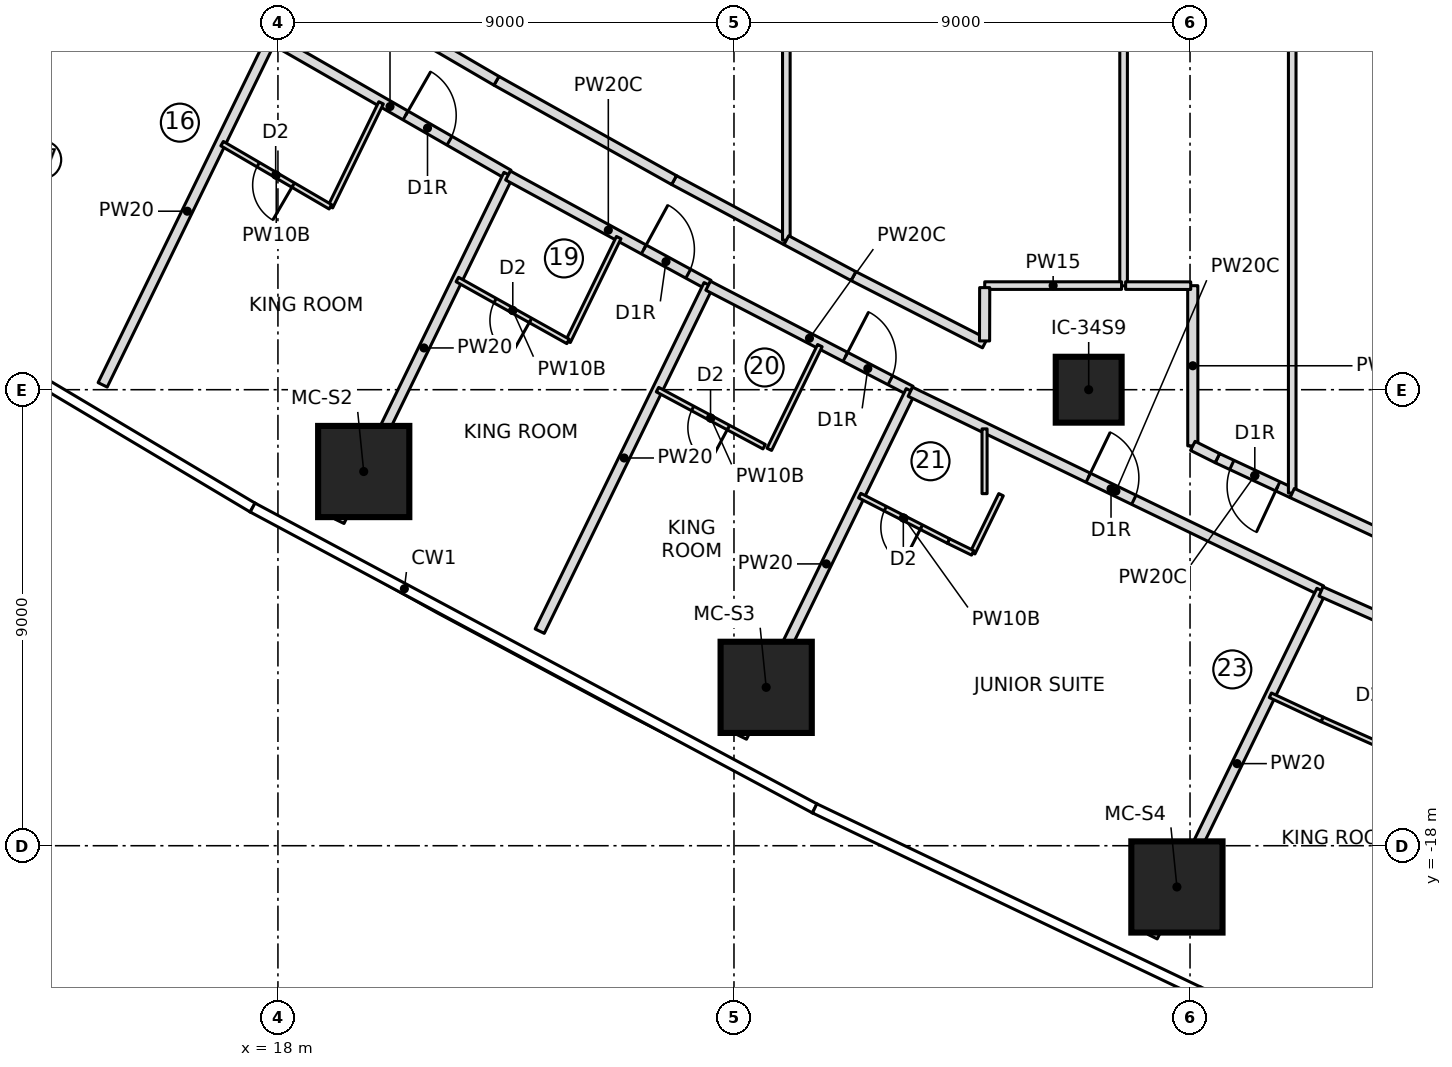
"""IFC4 building model, lengths in metres.
Left out: names, types, materials, properties, quantities, classifications, styles, units other than length and angle.
Written with IfcOpenShell. Run it as: python <this file> out.ifc"""

import sys

from ifc_helpers import new_model, si_unit, direction, frame, frame_2d, origin, origin_2d, place, context, subcontext, project, spatial, rectangle, extrude, element, fill, save


model = new_model("IFC4")
c1 = context("Model", 3, precision=1e-05, world=origin(), true_north=direction((0.0, 1.0)))
c2 = subcontext(c1, "Body", "Model", "MODEL_VIEW")
j1 = project(units=[si_unit("LENGTHUNIT", "METRE"), si_unit("PLANEANGLEUNIT", "RADIAN")], contexts=[c1])
p1 = place(None, origin())
s1 = spatial("IfcSite", under=j1, at=p1, CompositionType="ELEMENT")
p2 = place(p1, origin())
s2 = spatial("IfcBuilding", under=s1, at=p2, CompositionType="ELEMENT")
p3 = place(p2, frame((0.0, 0.0, 46.7)))
s3 = spatial("IfcBuildingStorey", under=s2, at=p3, CompositionType="ELEMENT", Elevation=46.7)
for number, where, z_axis, x_axis in (
    (1, (19.693, -10.615, 0.0), (0.0, 0.0, 1.0), (1.0, 0.0, 0.0)),
    (2, (27.635, -14.874, 0.0), (0.0, 0.0, 1.0), (1.0, 0.0, 0.0)),
    (3, (35.741, -18.814, 0.0), (0.0, 0.0, 1.0), (1.0, 0.0, 0.0)),
):
    element("IfcColumn", number, at=place(p3, frame(where, z_axis=z_axis, x_axis=x_axis)), inside=s3, PredefinedType="COLUMN", context=c2, shape_type="SweptSolid", body=[
        extrude(rectangle(XDim=1.8, YDim=1.8, at=origin_2d()), origin(), (0.0, 0.0, 1.0), 3.55),
    ])
p4 = place(p3, frame((34.0, -9.0, 0.0), z_axis=(0.0, 0.0, 1.0), x_axis=(1.0, 0.0, 0.0)))
e4 = element("IfcColumn", 4, at=p4, inside=s3, PredefinedType="COLUMN", context=c2, shape_type="SweptSolid", body=[
    extrude(rectangle(XDim=1.3, YDim=1.3, at=origin_2d()), origin(), (0.0, 0.0, 1.0), 3.55),
])
p5 = place(p3, frame((14.541, -8.904, 0.0), z_axis=(0.0, 0.0, 1.0), x_axis=(0.438213564788, 0.898870887078, 0.0)))
e5 = element("IfcWall", 5, at=p5, inside=s3, PredefinedType="PARTITIONING", context=c2, shape_type="SweptSolid", body=[
    extrude(rectangle(XDim=7.625, YDim=0.2, at=frame_2d((3.813, 0.0))), origin(), (0.0, 0.0, 1.0), 3.25),
])
p6 = place(p3, frame((17.874, -2.068, 0.0), z_axis=(0.0, 0.0, 1.0), x_axis=(0.867093061484, -0.4981461861, 0.0)))
e6 = element("IfcWall", 6, at=p6, inside=s3, PredefinedType="PARTITIONING", context=c2, shape_type="SweptSolid", body=[
    extrude(rectangle(XDim=5.393, YDim=0.2, at=frame_2d((2.697, 0.0))), origin(), (0.0, 0.0, 1.0), 3.25),
])
p7 = place(p6, frame((3.05, 0.0, 0.0)))
e7 = element("IfcOpeningElement", 7, at=p7, cuts=e6, PredefinedType="OPENING", context=c2, shape_type="SweptSolid", body=[
    extrude(rectangle(XDim=1.0, YDim=2.1, at=frame_2d((0.5, 1.05))), frame((0.0, 0.11, 0.0), z_axis=(0.0, -1.0, 0.0), x_axis=(1.0, 0.0, 0.0)), (0.0, 0.0, 1.0), 0.22),
])
p8 = place(p3, frame((20.035, -3.338, 0.0), z_axis=(0.0, 0.0, 1.0), x_axis=(-0.438122322582, -0.898915363344, 0.0)))
e8 = element("IfcWall", 8, at=p8, inside=s3, PredefinedType="PARTITIONING", context=c2, shape_type="SweptSolid", body=[
    extrude(rectangle(XDim=2.283, YDim=0.1, at=frame_2d((1.142, 0.0))), origin(), (0.0, 0.0, 1.0), 3.25),
])
p9 = place(p3, frame((19.035, -5.39, 0.0), z_axis=(0.0, 0.0, 1.0), x_axis=(-0.863707305865, 0.503993739837, 0.0)))
e9 = element("IfcWall", 9, at=p9, inside=s3, PredefinedType="PARTITIONING", context=c2, shape_type="SweptSolid", body=[
    extrude(rectangle(XDim=2.474, YDim=0.1, at=frame_2d((1.237, 0.0))), origin(), (0.0, 0.0, 1.0), 3.25),
])
p10 = place(p9, frame((0.85, 0.0, 0.0)))
e10 = element("IfcOpeningElement", 10, at=p10, cuts=e9, PredefinedType="OPENING", context=c2, shape_type="SweptSolid", body=[
    extrude(rectangle(XDim=0.8, YDim=2.1, at=frame_2d((0.4, 1.05))), frame((0.0, 0.06, 0.0), z_axis=(0.0, -1.0, 0.0), x_axis=(1.0, 0.0, 0.0)), (0.0, 0.0, 1.0), 0.12),
])
p11 = place(p3, frame((19.214, -11.597, 0.0), z_axis=(0.0, 0.0, 1.0), x_axis=(0.438210669268, 0.898872298683, 0.0)))
e11 = element("IfcWall", 11, at=p11, inside=s3, PredefinedType="PARTITIONING", context=c2, shape_type="SweptSolid", body=[
    extrude(rectangle(XDim=7.612, YDim=0.2, at=frame_2d((3.806, 0.0))), origin(), (0.0, 0.0, 1.0), 3.25),
])
p12 = place(p3, frame((22.541, -4.773, 0.0), z_axis=(0.0, 0.0, 1.0), x_axis=(0.878098348451, -0.478480188146, 0.0)))
e12 = element("IfcWall", 12, at=p12, inside=s3, PredefinedType="PARTITIONING", context=c2, shape_type="SweptSolid", body=[
    extrude(rectangle(XDim=4.508, YDim=0.2, at=frame_2d((2.254, 0.0))), origin(), (0.0, 0.0, 1.0), 3.25),
])
p13 = place(p12, frame((3.05, 0.0, 0.0)))
e13 = element("IfcOpeningElement", 13, at=p13, cuts=e12, PredefinedType="OPENING", context=c2, shape_type="SweptSolid", body=[
    extrude(rectangle(XDim=1.0, YDim=2.1, at=frame_2d((0.5, 1.05))), frame((0.0, 0.11, 0.0), z_axis=(0.0, -1.0, 0.0), x_axis=(1.0, 0.0, 0.0)), (0.0, 0.0, 1.0), 0.22),
])
p14 = place(p3, frame((24.725, -5.998, 0.0), z_axis=(0.0, 0.0, 1.0), x_axis=(-0.438197922062, -0.898878512982, 0.0)))
e14 = element("IfcWall", 14, at=p14, inside=s3, PredefinedType="PARTITIONING", context=c2, shape_type="SweptSolid", body=[
    extrude(rectangle(XDim=2.281, YDim=0.1, at=frame_2d((1.14, 0.0))), origin(), (0.0, 0.0, 1.0), 3.25),
])
p15 = place(p3, frame((23.726, -8.047, 0.0), z_axis=(0.0, 0.0, 1.0), x_axis=(-0.872778565067, 0.488116355349, 0.0)))
e15 = element("IfcWall", 15, at=p15, inside=s3, PredefinedType="PARTITIONING", context=c2, shape_type="SweptSolid", body=[
    extrude(rectangle(XDim=2.504, YDim=0.1, at=frame_2d((1.252, 0.0))), origin(), (0.0, 0.0, 1.0), 3.25),
])
p16 = place(p15, frame((0.85, 0.0, 0.0)))
e16 = element("IfcOpeningElement", 16, at=p16, cuts=e15, PredefinedType="OPENING", context=c2, shape_type="SweptSolid", body=[
    extrude(rectangle(XDim=0.8, YDim=2.1, at=frame_2d((0.4, 1.05))), frame((0.0, 0.06, 0.0), z_axis=(0.0, -1.0, 0.0), x_axis=(1.0, 0.0, 0.0)), (0.0, 0.0, 1.0), 0.12),
])
p17 = place(p3, frame((23.166, -13.766, 0.0), z_axis=(0.0, 0.0, 1.0), x_axis=(0.438215539964, 0.898869924146, 0.0)))
e17 = element("IfcWall", 17, at=p17, inside=s3, PredefinedType="PARTITIONING", context=c2, shape_type="SweptSolid", body=[
    extrude(rectangle(XDim=7.605, YDim=0.2, at=frame_2d((3.803, 0.0))), origin(), (0.0, 0.0, 1.0), 3.25),
])
p18 = place(p3, frame((26.49, -6.948, 0.0), z_axis=(0.0, 0.0, 1.0), x_axis=(0.887638836985, -0.460540220911, 0.0)))
e18 = element("IfcWall", 18, at=p18, inside=s3, PredefinedType="PARTITIONING", context=c2, shape_type="SweptSolid", body=[
    extrude(rectangle(XDim=4.504, YDim=0.2, at=frame_2d((2.252, 0.0))), origin(), (0.0, 0.0, 1.0), 3.25),
])
p19 = place(p18, frame((3.05, 0.0, 0.0)))
e19 = element("IfcOpeningElement", 19, at=p19, cuts=e18, PredefinedType="OPENING", context=c2, shape_type="SweptSolid", body=[
    extrude(rectangle(XDim=1.0, YDim=2.1, at=frame_2d((0.5, 1.05))), frame((0.0, 0.11, 0.0), z_axis=(0.0, -1.0, 0.0), x_axis=(1.0, 0.0, 0.0)), (0.0, 0.0, 1.0), 0.22),
])
p20 = place(p3, frame((28.695, -8.13, 0.0), z_axis=(0.0, 0.0, 1.0), x_axis=(-0.438229314017, -0.898863208912, 0.0)))
e20 = element("IfcWall", 20, at=p20, inside=s3, PredefinedType="PARTITIONING", context=c2, shape_type="SweptSolid", body=[
    extrude(rectangle(XDim=2.277, YDim=0.1, at=frame_2d((1.139, 0.0))), origin(), (0.0, 0.0, 1.0), 3.25),
])
p21 = place(p3, frame((27.595, -10.125, 0.0), z_axis=(0.0, 0.0, 1.0), x_axis=(-0.881666905428, 0.471872300388, 0.0)))
e21 = element("IfcWall", 21, at=p21, inside=s3, PredefinedType="PARTITIONING", context=c2, shape_type="SweptSolid", body=[
    extrude(rectangle(XDim=2.387, YDim=0.1, at=frame_2d((1.194, 0.0))), origin(), (0.0, 0.0, 1.0), 3.25),
])
p22 = place(p21, frame((0.8, 0.0, 0.0)))
e22 = element("IfcOpeningElement", 22, at=p22, cuts=e21, PredefinedType="OPENING", context=c2, shape_type="SweptSolid", body=[
    extrude(rectangle(XDim=0.8, YDim=2.1, at=frame_2d((0.4, 1.05))), frame((0.0, 0.06, 0.0), z_axis=(0.0, -1.0, 0.0), x_axis=(1.0, 0.0, 0.0)), (0.0, 0.0, 1.0), 0.12),
])
p23 = place(p3, frame((27.157, -15.854, 0.0), z_axis=(0.0, 0.0, 1.0), x_axis=(0.43822365664, 0.898865967072, 0.0)))
e23 = element("IfcWall", 23, at=p23, inside=s3, PredefinedType="PARTITIONING", context=c2, shape_type="SweptSolid", body=[
    extrude(rectangle(XDim=7.601, YDim=0.2, at=frame_2d((3.801, 0.0))), origin(), (0.0, 0.0, 1.0), 3.25),
])
p24 = place(p3, frame((30.48, -9.04, 0.0), z_axis=(0.0, 0.0, 1.0), x_axis=(0.900265089934, -0.43534212735, 0.0)))
e24 = element("IfcWall", 24, at=p24, inside=s3, PredefinedType="PARTITIONING", context=c2, shape_type="SweptSolid", body=[
    extrude(rectangle(XDim=9.013, YDim=0.2, at=frame_2d((4.506, 0.0))), origin(), (0.0, 0.0, 1.0), 3.25),
])
p25 = place(p24, frame((3.9, 0.0, 0.0)))
e25 = element("IfcOpeningElement", 25, at=p25, cuts=e24, PredefinedType="OPENING", context=c2, shape_type="SweptSolid", body=[
    extrude(rectangle(XDim=1.0, YDim=2.1, at=frame_2d((0.5, 1.05))), frame((0.0, 0.11, 0.0), z_axis=(0.0, -1.0, 0.0), x_axis=(1.0, 0.0, 0.0)), (0.0, 0.0, 1.0), 0.22),
])
p26 = place(p3, frame((32.27, -11.072, 0.0), z_axis=(0.0, 0.0, 1.0), x_axis=(-0.438167492606, -0.898893346523, 0.0)))
e26 = element("IfcWall", 26, at=p26, inside=s3, PredefinedType="PARTITIONING", context=c2, shape_type="SweptSolid", body=[
    extrude(rectangle(XDim=1.277, YDim=0.1, at=frame_2d((0.639, 0.0))), origin(), (0.0, 0.0, 1.0), 3.25),
])
p27 = place(p3, frame((31.71, -12.22, 0.0), z_axis=(0.0, 0.0, 1.0), x_axis=(-0.898155091862, 0.43967878157, 0.0)))
e27 = element("IfcWall", 27, at=p27, inside=s3, PredefinedType="PARTITIONING", context=c2, shape_type="SweptSolid", body=[
    extrude(rectangle(XDim=0.532, YDim=0.1, at=frame_2d((0.266, 0.0))), origin(), (0.0, 0.0, 1.0), 3.25),
])
p28 = place(p3, frame((31.232, -11.986, 0.0), z_axis=(0.0, 0.0, 1.0), x_axis=(-0.890194338621, 0.455580991138, 0.0)))
e28 = element("IfcWall", 28, at=p28, inside=s3, PredefinedType="PARTITIONING", context=c2, shape_type="SweptSolid", body=[
    extrude(rectangle(XDim=1.968, YDim=0.1, at=frame_2d((0.984, 0.0))), origin(), (0.0, 0.0, 1.0), 3.25),
])
p29 = place(p28, frame((0.6, 0.0, 0.0)))
e29 = element("IfcOpeningElement", 29, at=p29, cuts=e28, PredefinedType="OPENING", context=c2, shape_type="SweptSolid", body=[
    extrude(rectangle(XDim=0.8, YDim=2.1, at=frame_2d((0.4, 1.05))), frame((0.0, 0.06, 0.0), z_axis=(0.0, -1.0, 0.0), x_axis=(1.0, 0.0, 0.0)), (0.0, 0.0, 1.0), 0.12),
])
p30 = place(p3, frame((35.263, -19.796, 0.0), z_axis=(0.0, 0.0, 1.0), x_axis=(0.438197705697, 0.898878618459, 0.0)))
e30 = element("IfcWall", 30, at=p30, inside=s3, PredefinedType="PARTITIONING", context=c2, shape_type="SweptSolid", body=[
    extrude(rectangle(XDim=7.601, YDim=0.2, at=frame_2d((3.801, 0.0))), origin(), (0.0, 0.0, 1.0), 3.25),
])
p31 = place(p3, frame((38.585, -12.981, 0.0), z_axis=(0.0, 0.0, 1.0), x_axis=(0.914010307464, -0.40569096348, 0.0)))
e31 = element("IfcWall", 31, at=p31, inside=s3, PredefinedType="PARTITIONING", context=c2, shape_type="SweptSolid", body=[
    extrude(rectangle(XDim=4.506, YDim=0.2, at=frame_2d((2.253, 0.0))), origin(), (0.0, 0.0, 1.0), 3.25),
])
p32 = place(p31, frame((3.05, 0.0, 0.0)))
e32 = element("IfcOpeningElement", 32, at=p32, cuts=e31, PredefinedType="OPENING", context=c2, shape_type="SweptSolid", body=[
    extrude(rectangle(XDim=1.0, YDim=2.1, at=frame_2d((0.5, 1.05))), frame((0.0, 0.11, 0.0), z_axis=(0.0, -1.0, 0.0), x_axis=(1.0, 0.0, 0.0)), (0.0, 0.0, 1.0), 0.22),
])
p33 = place(p3, frame((39.863, -16.065, 0.0), z_axis=(0.0, 0.0, 1.0), x_axis=(-0.913972512123, 0.405776104625, 0.0)))
e33 = element("IfcWall", 33, at=p33, inside=s3, PredefinedType="PARTITIONING", context=c2, shape_type="SweptSolid", body=[
    extrude(rectangle(XDim=1.375, YDim=0.1, at=frame_2d((0.688, 0.0))), origin(), (0.0, 0.0, 1.0), 3.25),
])
p34 = place(p3, frame((38.606, -15.507, 0.0), z_axis=(0.0, 0.0, 1.0), x_axis=(-0.90632717857, 0.422576673972, 0.0)))
e34 = element("IfcWall", 34, at=p34, inside=s3, PredefinedType="PARTITIONING", context=c2, shape_type="SweptSolid", body=[
    extrude(rectangle(XDim=1.125, YDim=0.1, at=frame_2d((0.563, 0.0))), origin(), (0.0, 0.0, 1.0), 3.25),
])
p35 = place(p3, frame((39.37, -21.645, 0.0), z_axis=(0.0, 0.0, 1.0), x_axis=(0.438202247191, 0.898876404494, 0.0)))
e35 = element("IfcWall", 35, at=p35, inside=s3, PredefinedType="PARTITIONING", context=c2, shape_type="SweptSolid", body=[
    extrude(rectangle(XDim=7.605, YDim=0.2, at=frame_2d((3.802, 0.0))), origin(), (0.0, 0.0, 1.0), 3.25),
])
p36 = place(p3, frame((28.033, -6.049, 0.0), z_axis=(0.0, 0.0, 1.0), x_axis=(-0.881650280758, 0.471903361335, 0.0)))
e36 = element("IfcWall", 36, at=p36, inside=s3, PredefinedType="PARTITIONING", context=c2, shape_type="SweptSolid", body=[
    extrude(rectangle(XDim=2.514, YDim=0.2, at=frame_2d((1.257, 0.0))), origin(), (0.0, 0.0, 1.0), 3.25),
])
p37 = place(p3, frame((25.817, -4.863, 0.0), z_axis=(0.0, 0.0, 1.0), x_axis=(-0.872800289292, 0.488077509225, 0.0)))
e37 = element("IfcWall", 37, at=p37, inside=s3, PredefinedType="PARTITIONING", context=c2, shape_type="SweptSolid", body=[
    extrude(rectangle(XDim=4.016, YDim=0.2, at=frame_2d((2.008, 0.0))), origin(), (0.0, 0.0, 1.0), 3.25),
])
p38 = place(p3, frame((22.312, -2.903, 0.0), z_axis=(0.0, 0.0, 1.0), x_axis=(-0.863710538269, 0.503988200341, 0.0)))
e38 = element("IfcWall", 38, at=p38, inside=s3, PredefinedType="PARTITIONING", context=c2, shape_type="SweptSolid", body=[
    extrude(rectangle(XDim=4.016, YDim=0.2, at=frame_2d((2.008, 0.0))), origin(), (0.0, 0.0, 1.0), 3.25),
])
p39 = place(p3, frame((28.033, -6.049, 0.0), z_axis=(0.0, 0.0, 1.0), x_axis=(0.0, 1.0, 0.0)))
e39 = element("IfcWall", 39, at=p39, inside=s3, PredefinedType="PARTITIONING", context=c2, shape_type="SweptSolid", body=[
    extrude(rectangle(XDim=12.099, YDim=0.15, at=frame_2d((6.049, 0.0))), origin(), (0.0, 0.0, 1.0), 3.25),
])
p40 = place(p3, frame((31.95, -8.085, 0.0), z_axis=(0.0, 0.0, 1.0), x_axis=(-0.890213377055, 0.455543788579, 0.0)))
e40 = element("IfcWall", 40, at=p40, inside=s3, PredefinedType="PARTITIONING", context=c2, shape_type="SweptSolid", body=[
    extrude(rectangle(XDim=2.912, YDim=0.2, at=frame_2d((1.456, 0.0))), origin(), (0.0, 0.0, 1.0), 3.25),
])
p41 = place(p3, frame((29.357, -6.758, 0.0), z_axis=(0.0, 0.0, 1.0), x_axis=(-0.881663555886, 0.471878558764, 0.0)))
e41 = element("IfcWall", 41, at=p41, inside=s3, PredefinedType="PARTITIONING", context=c2, shape_type="SweptSolid", body=[
    extrude(rectangle(XDim=1.502, YDim=0.2, at=frame_2d((0.751, 0.0))), origin(), (0.0, 0.0, 1.0), 3.25),
])
p42 = place(p3, frame((34.689, -6.95, 0.0), z_axis=(0.0, 0.0, 1.0), x_axis=(0.0, 1.0, 0.0)))
e42 = element("IfcWall", 42, at=p42, inside=s3, PredefinedType="PARTITIONING", context=c2, shape_type="SweptSolid", body=[
    extrude(rectangle(XDim=13.9, YDim=0.15, at=frame_2d((6.95, 0.0))), origin(), (0.0, 0.0, 1.0), 3.25),
])
p43 = place(p3, frame((38.017, -11.039, 0.0), z_axis=(0.0, 0.0, 1.0), x_axis=(-0.906378304335, 0.422467003955, 0.0)))
e43 = element("IfcWall", 43, at=p43, inside=s3, PredefinedType="PARTITIONING", context=c2, shape_type="SweptSolid", body=[
    extrude(rectangle(XDim=1.629, YDim=0.2, at=frame_2d((0.814, 0.0))), origin(), (0.0, 0.0, 1.0), 3.25),
])
p44 = place(p43, frame((0.315, 0.0, 0.0)))
e44 = element("IfcOpeningElement", 44, at=p44, cuts=e43, PredefinedType="OPENING", context=c2, shape_type="SweptSolid", body=[
    extrude(rectangle(XDim=1.0, YDim=2.1, at=frame_2d((0.5, 1.05))), frame((0.0, 0.11, 0.0), z_axis=(0.0, -1.0, 0.0), x_axis=(1.0, 0.0, 0.0)), (0.0, 0.0, 1.0), 0.22),
])
p45 = place(p3, frame((38.017, -11.039, 0.0), z_axis=(0.0, 0.0, 1.0), x_axis=(0.0, 1.0, 0.0)))
e45 = element("IfcWall", 45, at=p45, inside=s3, PredefinedType="PARTITIONING", context=c2, shape_type="SweptSolid", body=[
    extrude(rectangle(XDim=22.079, YDim=0.15, at=frame_2d((11.039, 0.0))), origin(), (0.0, 0.0, 1.0), 3.25),
])
p46 = place(p3, frame((40.18, -12.048, 0.0), z_axis=(0.0, 0.0, 1.0), x_axis=(-0.906326822236, 0.422577438223, 0.0)))
e46 = element("IfcWall", 46, at=p46, inside=s3, PredefinedType="PARTITIONING", context=c2, shape_type="SweptSolid", body=[
    extrude(rectangle(XDim=2.387, YDim=0.2, at=frame_2d((1.193, 0.0))), origin(), (0.0, 0.0, 1.0), 3.25),
])
p47 = place(p3, frame((31.945, -9.773, 0.0), z_axis=(0.0, 0.0, 1.0), x_axis=(0.000190949013, -0.999999981769, 0.0)))
e47 = element("IfcWall", 47, at=p47, inside=s3, PredefinedType="PARTITIONING", context=c2, shape_type="SweptSolid", body=[
    extrude(rectangle(XDim=1.279, YDim=0.1, at=frame_2d((0.639, 0.0))), origin(), (0.0, 0.0, 1.0), 3.25),
])
p48 = place(p3, frame((34.649, -6.945, 0.0), z_axis=(0.0, 0.0, 1.0), x_axis=(-0.999999995915, -9.0391394e-05, 0.0)))
e48 = element("IfcWall", 48, at=p48, inside=s3, PredefinedType="PARTITIONING", context=c2, shape_type="SweptSolid", body=[
    extrude(rectangle(XDim=2.701, YDim=0.15, at=frame_2d((1.351, 0.0))), origin(), (0.0, 0.0, 1.0), 3.25),
])
p49 = place(p3, frame((31.948, -6.985, 0.0), z_axis=(0.0, 0.0, 1.0), x_axis=(-0.00278485808, -0.999996122275, 0.0)))
e49 = element("IfcWall", 49, at=p49, inside=s3, PredefinedType="PARTITIONING", context=c2, shape_type="SweptSolid", body=[
    extrude(rectangle(XDim=1.052, YDim=0.2, at=frame_2d((0.526, 0.0))), origin(), (0.0, 0.0, 1.0), 3.25),
])
p50 = place(p3, frame((36.055, -10.108, 0.0), z_axis=(0.0, 0.0, 1.0), x_axis=(-0.000308880294, 0.999999952296, 0.0)))
e50 = element("IfcWall", 50, at=p50, inside=s3, PredefinedType="PARTITIONING", context=c2, shape_type="SweptSolid", body=[
    extrude(rectangle(XDim=3.162, YDim=0.2, at=frame_2d((1.581, 0.0))), origin(), (0.0, 0.0, 1.0), 3.25),
])
p51 = place(p3, frame((36.014, -6.947, 0.0), z_axis=(0.0, 0.0, 1.0), x_axis=(-0.999999115498, 0.001330038725, 0.0)))
e51 = element("IfcWall", 51, at=p51, inside=s3, PredefinedType="PARTITIONING", context=c2, shape_type="SweptSolid", body=[
    extrude(rectangle(XDim=1.285, YDim=0.15, at=frame_2d((0.643, 0.0))), origin(), (0.0, 0.0, 1.0), 3.25),
])
p52 = place(p3, frame((36.54, -10.351, 0.0), z_axis=(0.0, 0.0, 1.0), x_axis=(-0.894337154042, 0.447393624116, 0.0)))
e52 = element("IfcWall", 52, at=p52, inside=s3, PredefinedType="PARTITIONING", context=c2, shape_type="SweptSolid", body=[
    extrude(rectangle(XDim=0.542, YDim=0.2, at=frame_2d((0.271, 0.0))), origin(), (0.0, 0.0, 1.0), 3.25),
])
p53 = place(p10, origin())
e53 = element("IfcDoor", 53, at=p53, inside=s3, OperationType="SINGLE_SWING_LEFT", PredefinedType="DOOR", context=c2, shape_type="SweptSolid", body=[
    extrude(rectangle(XDim=0.8, YDim=2.1, at=frame_2d((0.4, 1.05))), frame((0.0, 0.025, 0.0), z_axis=(0.0, -1.0, 0.0), x_axis=(1.0, 0.0, 0.0)), (0.0, 0.0, 1.0), 0.05),
])
fill(e10, e53)
p54 = place(p7, origin())
e54 = element("IfcDoor", 54, at=p54, inside=s3, OperationType="SINGLE_SWING_RIGHT", PredefinedType="DOOR", context=c2, shape_type="SweptSolid", body=[
    extrude(rectangle(XDim=1.0, YDim=2.1, at=frame_2d((0.5, 1.05))), frame((0.0, 0.025, 0.0), z_axis=(0.0, -1.0, 0.0), x_axis=(1.0, 0.0, 0.0)), (0.0, 0.0, 1.0), 0.05),
])
fill(e7, e54)
p55 = place(p16, origin())
e55 = element("IfcDoor", 55, at=p55, inside=s3, OperationType="SINGLE_SWING_LEFT", PredefinedType="DOOR", context=c2, shape_type="SweptSolid", body=[
    extrude(rectangle(XDim=0.8, YDim=2.1, at=frame_2d((0.4, 1.05))), frame((0.0, 0.025, 0.0), z_axis=(0.0, -1.0, 0.0), x_axis=(1.0, 0.0, 0.0)), (0.0, 0.0, 1.0), 0.05),
])
fill(e16, e55)
p56 = place(p13, origin())
e56 = element("IfcDoor", 56, at=p56, inside=s3, OperationType="SINGLE_SWING_RIGHT", PredefinedType="DOOR", context=c2, shape_type="SweptSolid", body=[
    extrude(rectangle(XDim=1.0, YDim=2.1, at=frame_2d((0.5, 1.05))), frame((0.0, 0.025, 0.0), z_axis=(0.0, -1.0, 0.0), x_axis=(1.0, 0.0, 0.0)), (0.0, 0.0, 1.0), 0.05),
])
fill(e13, e56)
p57 = place(p22, origin())
e57 = element("IfcDoor", 57, at=p57, inside=s3, OperationType="SINGLE_SWING_LEFT", PredefinedType="DOOR", context=c2, shape_type="SweptSolid", body=[
    extrude(rectangle(XDim=0.8, YDim=2.1, at=frame_2d((0.4, 1.05))), frame((0.0, 0.025, 0.0), z_axis=(0.0, -1.0, 0.0), x_axis=(1.0, 0.0, 0.0)), (0.0, 0.0, 1.0), 0.05),
])
fill(e22, e57)
p58 = place(p19, origin())
e58 = element("IfcDoor", 58, at=p58, inside=s3, OperationType="SINGLE_SWING_RIGHT", PredefinedType="DOOR", context=c2, shape_type="SweptSolid", body=[
    extrude(rectangle(XDim=1.0, YDim=2.1, at=frame_2d((0.5, 1.05))), frame((0.0, 0.025, 0.0), z_axis=(0.0, -1.0, 0.0), x_axis=(1.0, 0.0, 0.0)), (0.0, 0.0, 1.0), 0.05),
])
fill(e19, e58)
p59 = place(p29, origin())
e59 = element("IfcDoor", 59, at=p59, inside=s3, OperationType="SINGLE_SWING_LEFT", PredefinedType="DOOR", context=c2, shape_type="SweptSolid", body=[
    extrude(rectangle(XDim=0.8, YDim=2.1, at=frame_2d((0.4, 1.05))), frame((0.0, 0.025, 0.0), z_axis=(0.0, -1.0, 0.0), x_axis=(1.0, 0.0, 0.0)), (0.0, 0.0, 1.0), 0.05),
])
fill(e29, e59)
p60 = place(p25, origin())
e60 = element("IfcDoor", 60, at=p60, inside=s3, OperationType="SINGLE_SWING_RIGHT", PredefinedType="DOOR", context=c2, shape_type="SweptSolid", body=[
    extrude(rectangle(XDim=1.0, YDim=2.1, at=frame_2d((0.5, 1.05))), frame((0.0, 0.025, 0.0), z_axis=(0.0, -1.0, 0.0), x_axis=(1.0, 0.0, 0.0)), (0.0, 0.0, 1.0), 0.05),
])
fill(e25, e60)
p61 = place(p44, origin())
e61 = element("IfcDoor", 61, at=p61, inside=s3, OperationType="SINGLE_SWING_RIGHT", PredefinedType="DOOR", context=c2, shape_type="SweptSolid", body=[
    extrude(rectangle(XDim=1.0, YDim=2.1, at=frame_2d((0.5, 1.05))), frame((0.0, 0.025, 0.0), z_axis=(0.0, -1.0, 0.0), x_axis=(1.0, 0.0, 0.0)), (0.0, 0.0, 1.0), 0.05),
])
fill(e44, e61)
save(model, sys.argv[1])
